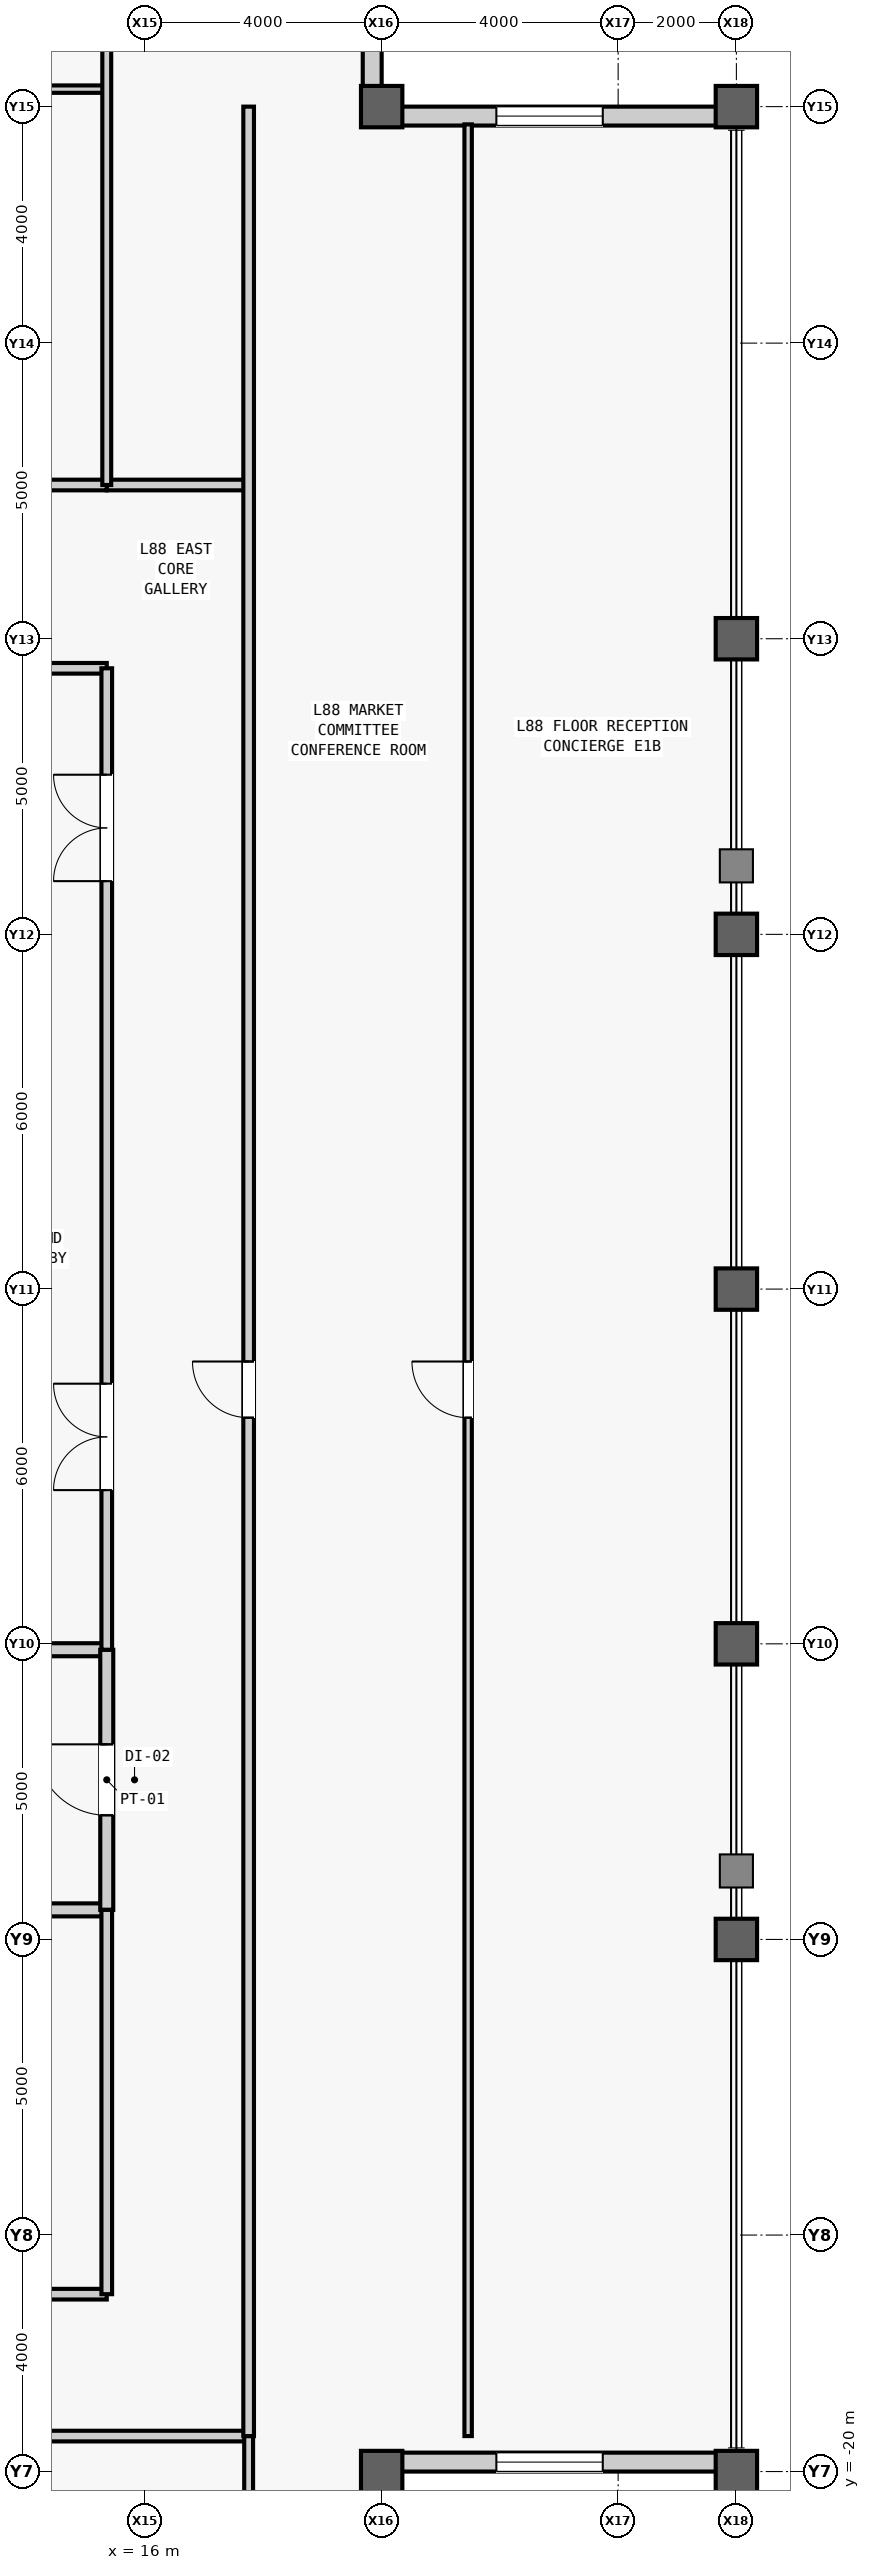
"""IFC4 building model, lengths in metres.
Left out: names, types, materials, properties, quantities, classifications, styles, units other than length and angle.
Written with IfcOpenShell. Run it as: python <this file> out.ifc"""

import sys

from ifc_helpers import new_model, si_unit, direction, frame, frame_2d, origin, origin_2d, place, context, subcontext, project, spatial, rectangle, hollow_rectangle, extrude, source, transform, mapped, element, fill, save


model = new_model("IFC4")
c1 = context("Model", 3, precision=1e-05, world=origin(), true_north=direction((0.0, 1.0)))
c2 = subcontext(c1, "Body", "Model", "MODEL_VIEW")
j1 = project(units=[si_unit("LENGTHUNIT", "METRE"), si_unit("PLANEANGLEUNIT", "RADIAN")], contexts=[c1])
p1 = place(None, origin())
s1 = spatial("IfcSite", under=j1, at=p1, CompositionType="ELEMENT")
p2 = place(p1, origin())
s2 = spatial("IfcBuilding", under=s1, at=p2, CompositionType="ELEMENT")
p3 = place(p2, frame((0.0, 0.0, 370.3)))
s3 = spatial("IfcBuildingStorey", under=s2, at=p3, CompositionType="ELEMENT", Elevation=370.3)
m1 = source(origin(), c2, "Body", "SweptSolid", [
    extrude(hollow_rectangle(XDim=0.7, YDim=0.7, WallThickness=0.04, at=origin_2d()), origin(), (0.0, 0.0, 1.0), 5.2),
])
for number, where, z_axis, x_axis in (
    (1, (20.0, -20.0, 0.0), (0.0, 0.0, 1.0), (1.0, 0.0, 0.0)),
    (2, (20.0, 20.0, 0.0), (0.0, 0.0, 1.0), (1.0, 0.0, 0.0)),
    (3, (26.0, -20.0, 0.0), (0.0, 0.0, 1.0), (1.0, 0.0, 0.0)),
    (4, (26.0, -11.0, 0.0), (0.0, 0.0, 1.0), (1.0, 0.0, 0.0)),
    (5, (26.0, -6.0, 0.0), (0.0, 0.0, 1.0), (1.0, 0.0, 0.0)),
    (6, (26.0, 0.0, 0.0), (0.0, 0.0, 1.0), (1.0, 0.0, 0.0)),
    (7, (26.0, 6.0, 0.0), (0.0, 0.0, 1.0), (1.0, 0.0, 0.0)),
    (8, (26.0, 11.0, 0.0), (0.0, 0.0, 1.0), (1.0, 0.0, 0.0)),
    (9, (26.0, 20.0, 0.0), (0.0, 0.0, 1.0), (1.0, 0.0, 0.0)),
):
    element("IfcColumn", number, at=place(p3, frame(where, z_axis=z_axis, x_axis=x_axis)), inside=s3, PredefinedType="COLUMN", context=c2, shape_type="MappedRepresentation", body=[
        mapped(m1, transform((0.0, 0.0, 0.0), scale=1.0)),
    ])
m2 = source(origin(), c2, "Body", "SweptSolid", [
    extrude(rectangle(XDim=5.68, YDim=0.32, at=frame_2d((2.84, 0.0))), origin(), (0.0, 0.0, 1.0), 4.051),
])
p4 = place(p3, frame((19.84, -25.68, 0.0), z_axis=(0.0, 0.0, 1.0), x_axis=(0.0, 1.0, 0.0)))
e10 = element("IfcWall", 10, at=p4, inside=s3, PredefinedType="STANDARD", context=c2, shape_type="MappedRepresentation", body=[
    mapped(m2, transform((0.0, 0.0, 0.0), scale=1.0)),
])
m3 = source(origin(), c2, "Body", "SweptSolid", [
    extrude(rectangle(XDim=1.8, YDim=2.4, at=frame_2d((0.9, 1.2))), frame((0.0, 0.17, 0.0), z_axis=(0.0, -1.0, 0.0), x_axis=(1.0, 0.0, 0.0)), (0.0, 0.0, 1.0), 0.34),
])
p5 = place(p4, frame((1.94, 0.0, 0.7)))
e11 = element("IfcOpeningElement", 11, at=p5, cuts=e10, PredefinedType="OPENING", context=c2, shape_type="MappedRepresentation", body=[
    mapped(m3, transform((0.0, 0.0, 0.0), scale=1.0)),
])
p6 = place(p3, frame((20.0, -19.84, 0.0), z_axis=(0.0, 0.0, 1.0), x_axis=(1.0, 0.0, 0.0)))
e12 = element("IfcWall", 12, at=p6, inside=s3, PredefinedType="STANDARD", context=c2, shape_type="MappedRepresentation", body=[
    mapped(m2, transform((0.0, 0.0, 0.0), scale=1.0)),
])
p7 = place(p6, frame((1.94, 0.0, 0.7)))
e13 = element("IfcOpeningElement", 13, at=p7, cuts=e12, PredefinedType="OPENING", context=c2, shape_type="MappedRepresentation", body=[
    mapped(m3, transform((0.0, 0.0, 0.0), scale=1.0)),
])
p8 = place(p3, frame((20.0, 19.84, 0.0), z_axis=(0.0, 0.0, 1.0), x_axis=(1.0, 0.0, 0.0)))
e14 = element("IfcWall", 14, at=p8, inside=s3, PredefinedType="STANDARD", context=c2, shape_type="MappedRepresentation", body=[
    mapped(m2, transform((0.0, 0.0, 0.0), scale=1.0)),
])
p9 = place(p8, frame((1.94, 0.0, 0.7)))
e15 = element("IfcOpeningElement", 15, at=p9, cuts=e14, PredefinedType="OPENING", context=c2, shape_type="MappedRepresentation", body=[
    mapped(m3, transform((0.0, 0.0, 0.0), scale=1.0)),
])
p10 = place(p3, frame((19.84, 20.0, 0.0), z_axis=(0.0, 0.0, 1.0), x_axis=(0.0, 1.0, 0.0)))
e16 = element("IfcWall", 16, at=p10, inside=s3, PredefinedType="STANDARD", context=c2, shape_type="MappedRepresentation", body=[
    mapped(m2, transform((0.0, 0.0, 0.0), scale=1.0)),
])
p11 = place(p10, frame((1.94, 0.0, 0.7)))
e17 = element("IfcOpeningElement", 17, at=p11, cuts=e16, PredefinedType="OPENING", context=c2, shape_type="MappedRepresentation", body=[
    mapped(m3, transform((0.0, 0.0, 0.0), scale=1.0)),
])
m4 = source(origin(), c2, "Body", "SweptSolid", [
    extrude(rectangle(XDim=4.05, YDim=0.22, at=frame_2d((2.025, 0.0))), origin(), (0.0, 0.0, 1.0), 4.6),
])
p12 = place(p3, frame((11.3, -10.5, 0.0), z_axis=(0.0, 0.0, 1.0), x_axis=(1.0, 0.0, 0.0)))
e18 = element("IfcWall", 18, at=p12, inside=s3, PredefinedType="PARTITIONING", context=c2, shape_type="MappedRepresentation", body=[
    mapped(m4, transform((0.0, 0.0, 0.0), scale=1.0)),
])
m5 = source(origin(), c2, "Body", "SweptSolid", [
    extrude(rectangle(XDim=4.05, YDim=0.22, at=frame_2d((2.025, 0.0))), origin(), (0.0, 0.0, 1.0), 2.8),
])
p13 = place(p3, frame((11.3, -6.1, 0.0), z_axis=(0.0, 0.0, 1.0), x_axis=(1.0, 0.0, 0.0)))
e19 = element("IfcWall", 19, at=p13, inside=s3, PredefinedType="PARTITIONING", context=c2, shape_type="MappedRepresentation", body=[
    mapped(m5, transform((0.0, 0.0, 0.0), scale=1.0)),
])
m6 = source(origin(), c2, "Body", "SweptSolid", [
    extrude(rectangle(XDim=4.4, YDim=0.22, at=frame_2d((2.2, 0.0))), origin(), (0.0, 0.0, 1.0), 4.6),
])
p14 = place(p3, frame((15.35, -10.5, 0.0), z_axis=(0.0, 0.0, 1.0), x_axis=(0.0, 1.0, 0.0)))
e20 = element("IfcWall", 20, at=p14, inside=s3, PredefinedType="PARTITIONING", context=c2, shape_type="MappedRepresentation", body=[
    mapped(m6, transform((0.0, 0.0, 0.0), scale=1.0)),
])
m7 = source(origin(), c2, "Body", "SweptSolid", [
    extrude(rectangle(XDim=1.2, YDim=2.2, at=frame_2d((0.6, 1.1))), frame((0.0, 0.12, 0.0), z_axis=(0.0, -1.0, 0.0), x_axis=(1.0, 0.0, 0.0)), (0.0, 0.0, 1.0), 0.24),
])
p15 = place(p14, frame((1.6, 0.0, 0.0)))
e21 = element("IfcOpeningElement", 21, at=p15, cuts=e20, PredefinedType="OPENING", context=c2, shape_type="MappedRepresentation", body=[
    mapped(m7, transform((0.0, 0.0, 0.0), scale=1.0)),
])
m8 = source(origin(), c2, "Body", "SweptSolid", [
    extrude(rectangle(XDim=4.05, YDim=0.18, at=frame_2d((2.025, 0.0))), origin(), (0.0, 0.0, 1.0), 4.6),
])
p16 = place(p3, frame((11.3, 10.5, 0.0), z_axis=(0.0, 0.0, 1.0), x_axis=(1.0, 0.0, 0.0)))
e22 = element("IfcWall", 22, at=p16, inside=s3, PredefinedType="PARTITIONING", context=c2, shape_type="MappedRepresentation", body=[
    mapped(m8, transform((0.0, 0.0, 0.0), scale=1.0)),
])
m9 = source(origin(), c2, "Body", "SweptSolid", [
    extrude(rectangle(XDim=16.6, YDim=0.18, at=frame_2d((8.3, 0.0))), origin(), (0.0, 0.0, 1.0), 4.6),
])
p17 = place(p3, frame((15.35, -6.1, 0.0), z_axis=(0.0, 0.0, 1.0), x_axis=(0.0, 1.0, 0.0)))
e23 = element("IfcWall", 23, at=p17, inside=s3, PredefinedType="PARTITIONING", context=c2, shape_type="MappedRepresentation", body=[
    mapped(m9, transform((0.0, 0.0, 0.0), scale=1.0)),
])
m10 = source(origin(), c2, "Body", "SweptSolid", [
    extrude(rectangle(XDim=1.8, YDim=2.25, at=frame_2d((0.9, 1.125))), frame((0.0, 0.1, 0.0), z_axis=(0.0, -1.0, 0.0), x_axis=(1.0, 0.0, 0.0)), (0.0, 0.0, 1.0), 0.2),
])
p18 = place(p17, frame((2.7, 0.0, 0.0)))
e24 = element("IfcOpeningElement", 24, at=p18, cuts=e23, PredefinedType="OPENING", context=c2, shape_type="MappedRepresentation", body=[
    mapped(m10, transform((0.0, 0.0, 0.0), scale=1.0)),
])
p19 = place(p17, frame((13.0, 0.0, 0.0)))
e25 = element("IfcOpeningElement", 25, at=p19, cuts=e23, PredefinedType="OPENING", context=c2, shape_type="MappedRepresentation", body=[
    mapped(m10, transform((0.0, 0.0, 0.0), scale=1.0)),
])
m11 = source(origin(), c2, "Body", "SweptSolid", [
    extrude(rectangle(XDim=14.05, YDim=0.18, at=frame_2d((7.025, 0.0))), origin(), (0.0, 0.0, 1.0), 4.6),
])
p20 = place(p3, frame((1.3, -17.0, 0.0), z_axis=(0.0, 0.0, 1.0), x_axis=(1.0, 0.0, 0.0)))
e26 = element("IfcWall", 26, at=p20, inside=s3, PredefinedType="PARTITIONING", context=c2, shape_type="MappedRepresentation", body=[
    mapped(m11, transform((0.0, 0.0, 0.0), scale=1.0)),
])
m12 = source(origin(), c2, "Body", "SweptSolid", [
    extrude(rectangle(XDim=0.9, YDim=2.15, at=frame_2d((0.45, 1.075))), frame((0.0, 0.1, 0.0), z_axis=(0.0, -1.0, 0.0), x_axis=(1.0, 0.0, 0.0)), (0.0, 0.0, 1.0), 0.2),
])
p21 = place(p20, frame((6.25, 0.0, 0.0)))
e27 = element("IfcOpeningElement", 27, at=p21, cuts=e26, PredefinedType="OPENING", context=c2, shape_type="MappedRepresentation", body=[
    mapped(m12, transform((0.0, 0.0, 0.0), scale=1.0)),
])
m13 = source(origin(), c2, "Body", "SweptSolid", [
    extrude(rectangle(XDim=6.5, YDim=0.18, at=frame_2d((3.25, 0.0))), origin(), (0.0, 0.0, 1.0), 4.6),
])
p22 = place(p3, frame((15.35, -17.0, 0.0), z_axis=(0.0, 0.0, 1.0), x_axis=(0.0, 1.0, 0.0)))
e28 = element("IfcWall", 28, at=p22, inside=s3, PredefinedType="PARTITIONING", context=c2, shape_type="MappedRepresentation", body=[
    mapped(m13, transform((0.0, 0.0, 0.0), scale=1.0)),
])
m14 = source(origin(), c2, "Body", "SweptSolid", [
    extrude(rectangle(XDim=2.4, YDim=0.18, at=frame_2d((1.2, 0.0))), origin(), (0.0, 0.0, 1.0), 4.6),
])
p23 = place(p3, frame((15.35, 13.6, 0.0), z_axis=(0.0, 0.0, 1.0), x_axis=(1.0, 0.0, 0.0)))
e29 = element("IfcWall", 29, at=p23, inside=s3, PredefinedType="PARTITIONING", context=c2, shape_type="MappedRepresentation", body=[
    mapped(m14, transform((0.0, 0.0, 0.0), scale=1.0)),
])
m15 = source(origin(), c2, "Body", "SweptSolid", [
    extrude(rectangle(XDim=36.3, YDim=0.18, at=frame_2d((18.15, 0.0))), origin(), (0.0, 0.0, 1.0), 4.253),
])
p24 = place(p3, frame((-18.55, -19.4, 0.0), z_axis=(0.0, 0.0, 1.0), x_axis=(1.0, 0.0, 0.0)))
e30 = element("IfcWall", 30, at=p24, inside=s3, PredefinedType="PARTITIONING", context=c2, shape_type="MappedRepresentation", body=[
    mapped(m15, transform((0.0, 0.0, 0.0), scale=1.0)),
])
m16 = source(origin(), c2, "Body", "SweptSolid", [
    extrude(rectangle(XDim=1.05, YDim=2.2, at=frame_2d((0.525, 1.1))), frame((0.0, 0.1, 0.0), z_axis=(0.0, -1.0, 0.0), x_axis=(1.0, 0.0, 0.0)), (0.0, 0.0, 1.0), 0.2),
])
p25 = place(p24, frame((6.872, 0.0, 0.0)))
e31 = element("IfcOpeningElement", 31, at=p25, cuts=e30, PredefinedType="OPENING", context=c2, shape_type="MappedRepresentation", body=[
    mapped(m16, transform((0.0, 0.0, 0.0), scale=1.0)),
])
p26 = place(p24, frame((19.44, 0.0, 0.0)))
e32 = element("IfcOpeningElement", 32, at=p26, cuts=e30, PredefinedType="OPENING", context=c2, shape_type="MappedRepresentation", body=[
    mapped(m16, transform((0.0, 0.0, 0.0), scale=1.0)),
])
p27 = place(p24, frame((30.168, 0.0, 0.0)))
e33 = element("IfcOpeningElement", 33, at=p27, cuts=e30, PredefinedType="OPENING", context=c2, shape_type="MappedRepresentation", body=[
    mapped(m16, transform((0.0, 0.0, 0.0), scale=1.0)),
])
m17 = source(origin(), c2, "Body", "SweptSolid", [
    extrude(rectangle(XDim=6.6, YDim=0.15, at=frame_2d((3.3, 0.0))), origin(), (0.0, 0.0, 1.0), 2.8),
])
p28 = place(p3, frame((17.75, -26.0, 0.0), z_axis=(0.0, 0.0, 1.0), x_axis=(0.0, 1.0, 0.0)))
e34 = element("IfcWall", 34, at=p28, inside=s3, PredefinedType="PARTITIONING", context=c2, shape_type="MappedRepresentation", body=[
    mapped(m17, transform((0.0, 0.0, 0.0), scale=1.0)),
])
m18 = source(origin(), c2, "Body", "SweptSolid", [
    extrude(rectangle(XDim=17.685, YDim=0.125, at=frame_2d((8.843, 0.0))), origin(), (0.0, 0.0, 1.0), 4.6),
])
p29 = place(p3, frame((-2.335, 20.296, 0.0), z_axis=(0.0, 0.0, 1.0), x_axis=(1.0, 0.0, 0.0)))
e35 = element("IfcWall", 35, at=p29, inside=s3, PredefinedType="PARTITIONING", context=c2, shape_type="MappedRepresentation", body=[
    mapped(m18, transform((0.0, 0.0, 0.0), scale=1.0)),
])
m19 = source(origin(), c2, "Body", "SweptSolid", [
    extrude(rectangle(XDim=0.95, YDim=2.15, at=frame_2d((0.475, 1.075))), frame((0.0, 0.073, 0.0), z_axis=(0.0, -1.0, 0.0), x_axis=(1.0, 0.0, 0.0)), (0.0, 0.0, 1.0), 0.145),
])
p30 = place(p29, frame((8.367, 0.0, 0.0)))
e36 = element("IfcOpeningElement", 36, at=p30, cuts=e35, PredefinedType="OPENING", context=c2, shape_type="MappedRepresentation", body=[
    mapped(m19, transform((0.0, 0.0, 0.0), scale=1.0)),
])
m20 = source(origin(), c2, "Body", "SweptSolid", [
    extrude(rectangle(XDim=32.75, YDim=0.18, at=frame_2d((16.375, 0.0))), origin(), (0.0, 0.0, 1.0), 4.6),
])
p31 = place(p3, frame((-17.4, 13.6, 0.0), z_axis=(0.0, 0.0, 1.0), x_axis=(1.0, 0.0, 0.0)))
e37 = element("IfcWall", 37, at=p31, inside=s3, PredefinedType="PARTITIONING", context=c2, shape_type="MappedRepresentation", body=[
    mapped(m20, transform((0.0, 0.0, 0.0), scale=1.0)),
])
p32 = place(p31, frame((27.075, 0.0, 0.0)))
e38 = element("IfcOpeningElement", 38, at=p32, cuts=e37, PredefinedType="OPENING", context=c2, shape_type="MappedRepresentation", body=[
    mapped(m16, transform((0.0, 0.0, 0.0), scale=1.0)),
])
m21 = source(origin(), c2, "Body", "SweptSolid", [
    extrude(rectangle(XDim=12.4, YDim=0.15, at=frame_2d((6.2, 0.0))), origin(), (0.0, 0.0, 1.0), 4.6),
])
p33 = place(p3, frame((15.35, 13.6, 0.0), z_axis=(0.0, 0.0, 1.0), x_axis=(0.0, 1.0, 0.0)))
e39 = element("IfcWall", 39, at=p33, inside=s3, PredefinedType="PARTITIONING", context=c2, shape_type="MappedRepresentation", body=[
    mapped(m21, transform((0.0, 0.0, 0.0), scale=1.0)),
])
m22 = source(origin(), c2, "Body", "SweptSolid", [
    extrude(rectangle(XDim=39.1, YDim=0.125, at=frame_2d((19.55, 0.0))), origin(), (0.0, 0.0, 1.0), 4.6),
])
p34 = place(p3, frame((21.462, -19.4, 0.0), z_axis=(0.0, 0.0, 1.0), x_axis=(0.0, 1.0, 0.0)))
e40 = element("IfcWall", 40, at=p34, inside=s3, PredefinedType="PARTITIONING", context=c2, shape_type="MappedRepresentation", body=[
    mapped(m22, transform((0.0, 0.0, 0.0), scale=1.0)),
])
p35 = place(p34, frame((17.225, 0.0, 0.0)))
e41 = element("IfcOpeningElement", 41, at=p35, cuts=e40, PredefinedType="OPENING", context=c2, shape_type="MappedRepresentation", body=[
    mapped(m19, transform((0.0, 0.0, 0.0), scale=1.0)),
])
m23 = source(origin(), c2, "Body", "SweptSolid", [
    extrude(rectangle(XDim=39.4, YDim=0.18, at=frame_2d((19.7, 0.0))), origin(), (0.0, 0.0, 1.0), 2.8),
])
p36 = place(p3, frame((17.75, -19.4, 0.0), z_axis=(0.0, 0.0, 1.0), x_axis=(0.0, 1.0, 0.0)))
e42 = element("IfcWall", 42, at=p36, inside=s3, PredefinedType="PARTITIONING", context=c2, shape_type="MappedRepresentation", body=[
    mapped(m23, transform((0.0, 0.0, 0.0), scale=1.0)),
])
m24 = source(origin(), c2, "Body", "SweptSolid", [
    extrude(rectangle(XDim=0.95, YDim=2.15, at=frame_2d((0.475, 1.075))), frame((0.0, 0.1, 0.0), z_axis=(0.0, -1.0, 0.0), x_axis=(1.0, 0.0, 0.0)), (0.0, 0.0, 1.0), 0.2),
])
p37 = place(p36, frame((17.225, 0.0, 0.0)))
e43 = element("IfcOpeningElement", 43, at=p37, cuts=e42, PredefinedType="OPENING", context=c2, shape_type="MappedRepresentation", body=[
    mapped(m24, transform((0.0, 0.0, 0.0), scale=1.0)),
])
m25 = source(origin(), c2, "Body", "SweptSolid", [
    extrude(rectangle(XDim=1.8, YDim=2.4, at=frame_2d((0.9, 1.2))), frame((0.0, 0.03, 0.0), z_axis=(0.0, -1.0, 0.0), x_axis=(1.0, 0.0, 0.0)), (0.0, 0.0, 1.0), 0.06),
])
p38 = place(p7, origin())
e44 = element("IfcWindow", 44, at=p38, inside=s3, PartitioningType="SINGLE_PANEL", PredefinedType="WINDOW", context=c2, shape_type="MappedRepresentation", body=[
    mapped(m25, transform((0.0, 0.0, 0.0), scale=1.0)),
])
fill(e13, e44)
p39 = place(p9, origin())
e45 = element("IfcWindow", 45, at=p39, inside=s3, PartitioningType="SINGLE_PANEL", PredefinedType="WINDOW", context=c2, shape_type="MappedRepresentation", body=[
    mapped(m25, transform((0.0, 0.0, 0.0), scale=1.0)),
])
fill(e15, e45)
m26 = source(origin(), c2, "Body", "SweptSolid", [
    extrude(rectangle(XDim=1.2, YDim=2.2, at=frame_2d((0.6, 1.1))), frame((0.0, 0.025, 0.0), z_axis=(0.0, -1.0, 0.0), x_axis=(1.0, 0.0, 0.0)), (0.0, 0.0, 1.0), 0.05),
])
p40 = place(p15, origin())
e46 = element("IfcDoor", 46, at=p40, inside=s3, OperationType="SINGLE_SWING_RIGHT", PredefinedType="DOOR", context=c2, shape_type="MappedRepresentation", body=[
    mapped(m26, transform((0.0, 0.0, 0.0), scale=1.0)),
])
fill(e21, e46)
m27 = source(origin(), c2, "Body", "SweptSolid", [
    extrude(rectangle(XDim=1.8, YDim=2.25, at=frame_2d((0.9, 1.125))), frame((0.0, 0.025, 0.0), z_axis=(0.0, -1.0, 0.0), x_axis=(1.0, 0.0, 0.0)), (0.0, 0.0, 1.0), 0.05),
])
p41 = place(p18, origin())
e47 = element("IfcDoor", 47, at=p41, inside=s3, OperationType="SINGLE_SWING_RIGHT", PredefinedType="DOOR", context=c2, shape_type="MappedRepresentation", body=[
    mapped(m27, transform((0.0, 0.0, 0.0), scale=1.0)),
])
fill(e24, e47)
p42 = place(p19, origin())
e48 = element("IfcDoor", 48, at=p42, inside=s3, OperationType="SINGLE_SWING_LEFT", PredefinedType="DOOR", context=c2, shape_type="MappedRepresentation", body=[
    mapped(m27, transform((0.0, 0.0, 0.0), scale=1.0)),
])
fill(e25, e48)
m28 = source(origin(), c2, "Body", "SweptSolid", [
    extrude(rectangle(XDim=0.95, YDim=2.15, at=frame_2d((0.475, 1.075))), frame((0.0, 0.025, 0.0), z_axis=(0.0, -1.0, 0.0), x_axis=(1.0, 0.0, 0.0)), (0.0, 0.0, 1.0), 0.05),
])
p43 = place(p35, origin())
e49 = element("IfcDoor", 49, at=p43, inside=s3, OperationType="SINGLE_SWING_RIGHT", PredefinedType="DOOR", context=c2, shape_type="MappedRepresentation", body=[
    mapped(m28, transform((0.0, 0.0, 0.0), scale=1.0)),
])
fill(e41, e49)
p44 = place(p37, origin())
e50 = element("IfcDoor", 50, at=p44, inside=s3, OperationType="SINGLE_SWING_RIGHT", PredefinedType="DOOR", context=c2, shape_type="MappedRepresentation", body=[
    mapped(m28, transform((0.0, 0.0, 0.0), scale=1.0)),
])
fill(e43, e50)
save(model, sys.argv[1])
